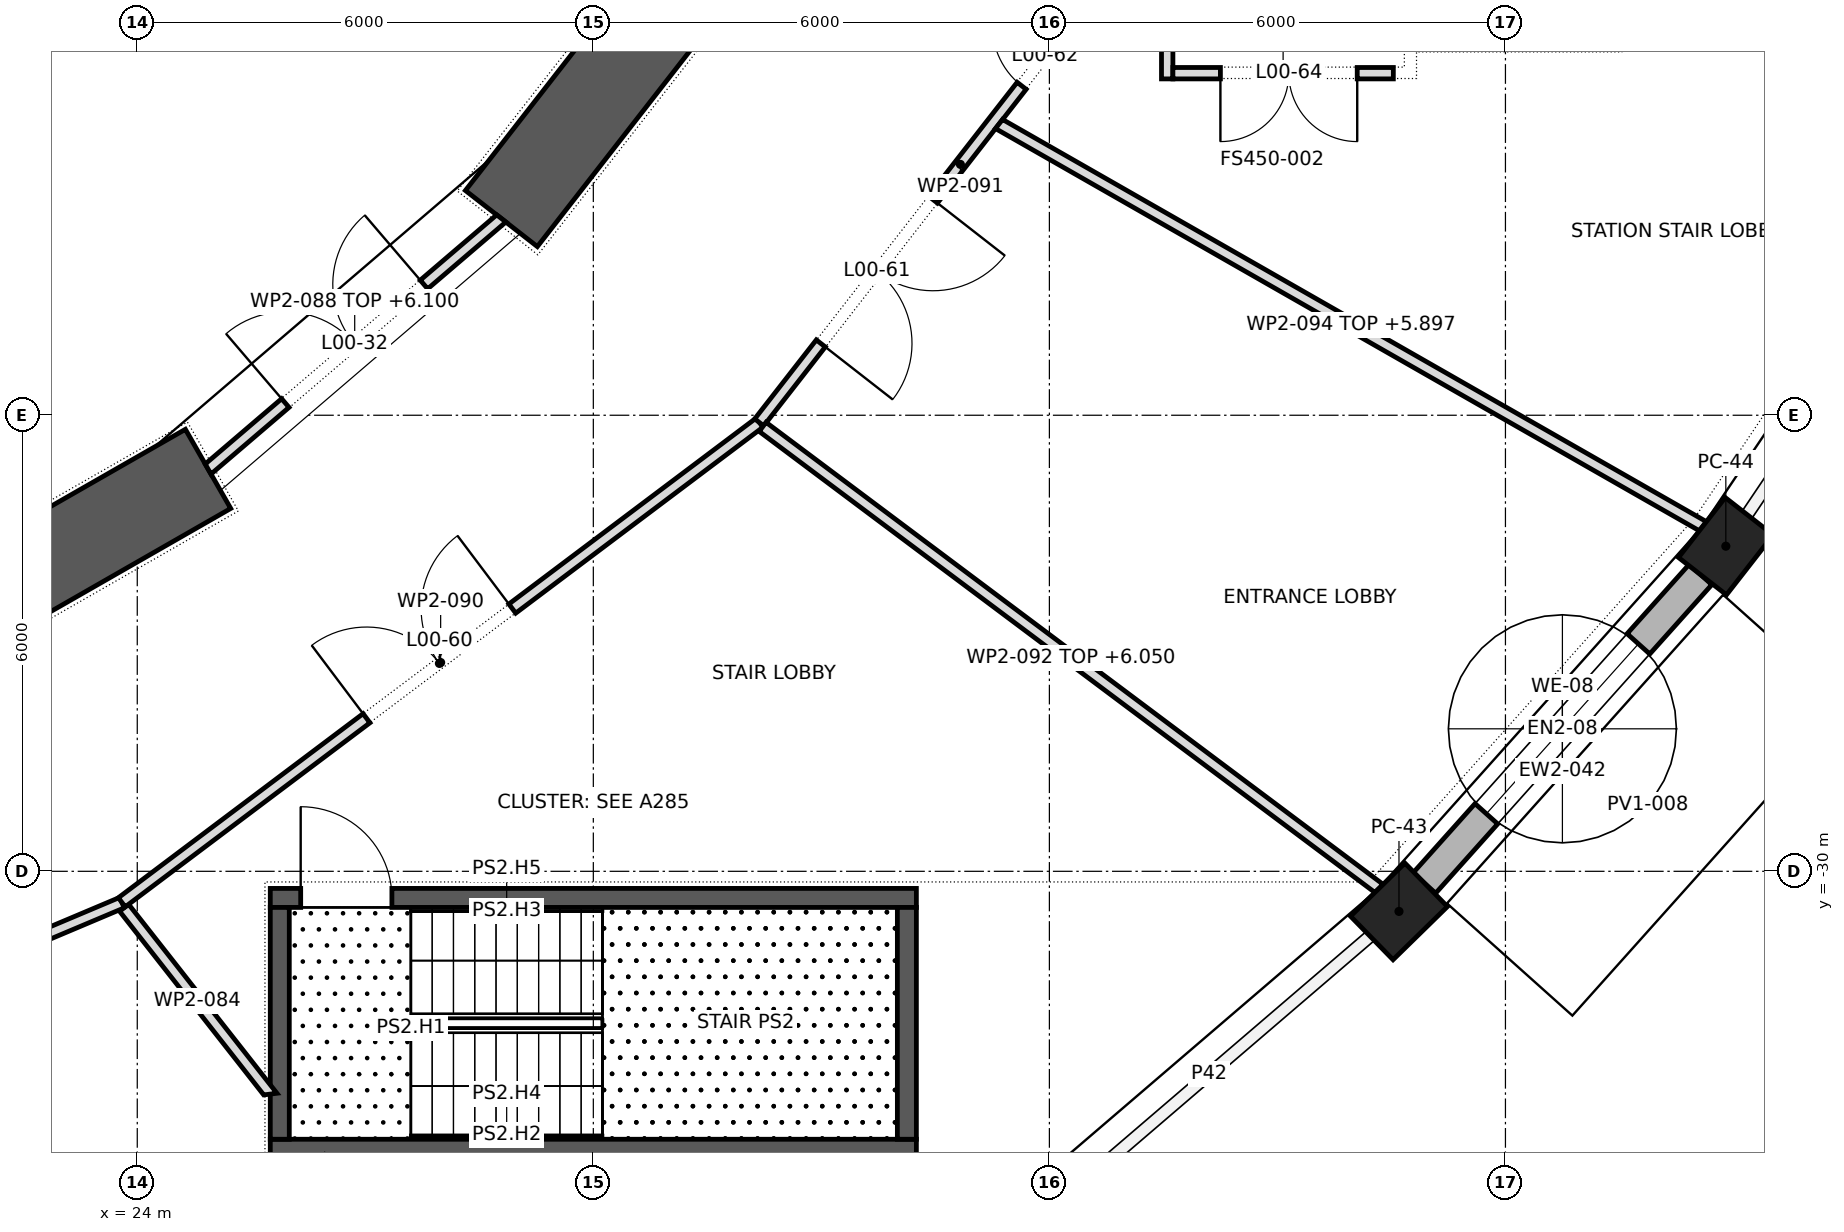
"""IFC4 building model, lengths in metres.
Left out: names, types, materials, properties, quantities, classifications, styles, units other than length and angle.
Written with IfcOpenShell. Run it as: python <this file> out.ifc"""

import sys

from ifc_helpers import new_model, si_unit, direction, frame, frame_2d, origin, origin_2d, place, context, subcontext, project, spatial, polyline, rectangle, outline, extrude, element, fill, save


model = new_model("IFC4")
c1 = context("Model", 3, precision=1e-05, world=origin(), true_north=direction((0.0, 1.0)))
c2 = subcontext(c1, "Body", "Model", "MODEL_VIEW")
j1 = project(units=[si_unit("LENGTHUNIT", "METRE"), si_unit("PLANEANGLEUNIT", "RADIAN")], contexts=[c1])
p1 = place(None, origin())
s1 = spatial("IfcSite", under=j1, at=p1, CompositionType="ELEMENT")
p2 = place(p1, origin())
s2 = spatial("IfcBuilding", under=s1, at=p2, CompositionType="ELEMENT")
p3 = place(p2, origin())
s3 = spatial("IfcBuildingStorey", under=s2, at=p3, CompositionType="ELEMENT", Elevation=0.0)
for number, where, z_axis, x_axis in (
    (1, (40.599, -30.528, 0.0), (0.0, 0.0, 1.0), (0.715, 0.699, 0.0)),
    (2, (44.899, -25.723, 0.0), (0.0, 0.0, 1.0), (0.615, 0.789, 0.0)),
):
    element("IfcColumn", number, at=place(p3, frame(where, z_axis=z_axis, x_axis=x_axis)), inside=s3, PredefinedType="COLUMN", context=c2, shape_type="SweptSolid", body=[
        extrude(rectangle(XDim=1.0, YDim=0.8, at=origin_2d()), origin(), (0.0, 0.0, 1.0), 7.0),
    ])
p4 = place(p3, frame((17.089, -29.198, 0.0), z_axis=(0.0, 0.0, 1.0), x_axis=(0.867760656864, 0.496982336103, 0.0)))
e3 = element("IfcWall", 3, at=p4, inside=s3, PredefinedType="SHEAR", context=c2, shape_type="SweptSolid", body=[
    extrude(rectangle(XDim=9.038, YDim=1.2, at=frame_2d((4.519, 0.0))), origin(), (0.0, 0.0, 1.0), 7.0),
])
p5 = place(p3, frame((28.79, -21.412, 0.0), z_axis=(0.0, 0.0, 1.0), x_axis=(0.614825322247, 0.788663314174, 0.0)))
e4 = element("IfcWall", 4, at=p5, inside=s3, PredefinedType="SHEAR", context=c2, shape_type="SweptSolid", body=[
    extrude(rectangle(XDim=8.632, YDim=1.2, at=frame_2d((4.316, 0.0))), origin(), (0.0, 0.0, 1.0), 7.0),
])
p6 = place(p3, frame((40.933, -30.155, 0.0), z_axis=(0.0, 0.0, 1.0), x_axis=(0.666902265084, 0.745145199827, 0.0)))
e5 = element("IfcWall", 5, at=p6, inside=s3, PredefinedType="STANDARD", context=c2, shape_type="SweptSolid", body=[
    extrude(rectangle(XDim=5.448, YDim=0.4, at=frame_2d((2.724, 0.0))), origin(), (0.0, 0.0, 1.0), 6.2),
])
p7 = place(p6, frame((1.224, 0.0, 0.0)))
e6 = element("IfcOpeningElement", 6, at=p7, cuts=e5, PredefinedType="OPENING", context=c2, shape_type="SweptSolid", body=[
    extrude(rectangle(XDim=3.0, YDim=3.0, at=frame_2d((1.5, 1.5))), frame((0.0, 0.212, 0.0), z_axis=(0.0, -1.0, 0.0), x_axis=(1.0, 0.0, 0.0)), (0.0, 0.0, 1.0), 0.424),
])
p8 = place(p6, frame((1.224, 0.0, 3.45)))
e7 = element("IfcOpeningElement", 7, at=p8, cuts=e5, PredefinedType="OPENING", context=c2, shape_type="SweptSolid", body=[
    extrude(rectangle(XDim=3.0, YDim=2.25, at=frame_2d((1.5, 1.125))), frame((0.0, 0.212, 0.0), z_axis=(0.0, -1.0, 0.0), x_axis=(1.0, 0.0, 0.0)), (0.0, 0.0, 1.0), 0.424),
])
p9 = place(p3, frame((25.75, -30.35, 0.0), z_axis=(0.0, 0.0, 1.0), x_axis=(1.0, 0.0, 0.0)))
e8 = element("IfcWall", 8, at=p9, inside=s3, PredefinedType="SHEAR", context=c2, shape_type="SweptSolid", body=[
    extrude(rectangle(XDim=8.5, YDim=0.25, at=frame_2d((4.25, 0.0))), origin(), (0.0, 0.0, 1.0), 6.65),
])
p10 = place(p9, frame((0.4, 0.0, 0.0)))
e9 = element("IfcOpeningElement", 9, at=p10, cuts=e8, PredefinedType="OPENING", context=c2, shape_type="SweptSolid", body=[
    extrude(rectangle(XDim=1.2, YDim=2.1, at=frame_2d((0.6, 1.05))), frame((0.0, 0.137, 0.0), z_axis=(0.0, -1.0, 0.0), x_axis=(1.0, 0.0, 0.0)), (0.0, 0.0, 1.0), 0.274),
])
p11 = place(p3, frame((25.75, -33.65, 0.0), z_axis=(0.0, 0.0, 1.0), x_axis=(1.0, 0.0, 0.0)))
e10 = element("IfcWall", 10, at=p11, inside=s3, PredefinedType="SHEAR", context=c2, shape_type="SweptSolid", body=[
    extrude(rectangle(XDim=8.5, YDim=0.25, at=frame_2d((4.25, 0.0))), origin(), (0.0, 0.0, 1.0), 6.65),
])
for number, where, z_axis, x_axis in (
    (11, (25.875, -33.525, 0.0), (0.0, 0.0, 1.0), (0.0, 1.0, 0.0)),
    (12, (34.125, -33.525, 0.0), (0.0, 0.0, 1.0), (0.0, 1.0, 0.0)),
):
    element("IfcWall", number, at=place(p3, frame(where, z_axis=z_axis, x_axis=x_axis)), inside=s3, PredefinedType="SHEAR", context=c2, shape_type="SweptSolid", body=[
        extrude(rectangle(XDim=3.05, YDim=0.25, at=frame_2d((1.525, 0.0))), origin(), (0.0, 0.0, 1.0), 6.65),
    ])
p12 = place(p3, frame((13.776, -34.643, 0.0), z_axis=(0.0, 0.0, 1.0), x_axis=(0.921269574612, 0.388924633951, 0.0)))
e13 = element("IfcWall", 13, at=p12, inside=s3, PredefinedType="PARTITIONING", context=c2, shape_type="SweptSolid", body=[
    extrude(rectangle(XDim=10.879, YDim=0.15, at=frame_2d((5.439, 0.0))), origin(), (0.0, 0.0, 1.0), 6.65),
])
p13 = place(p12, frame((7.626, 0.0, 0.0)))
e14 = element("IfcOpeningElement", 14, at=p13, cuts=e13, PredefinedType="OPENING", context=c2, shape_type="SweptSolid", body=[
    extrude(rectangle(XDim=1.0, YDim=2.1, at=frame_2d((0.5, 1.05))), frame((0.0, 0.087, 0.0), z_axis=(0.0, -1.0, 0.0), x_axis=(1.0, 0.0, 0.0)), (0.0, 0.0, 1.0), 0.174),
])
p14 = place(p12, frame((2.218, 0.0, 0.0)))
e15 = element("IfcOpeningElement", 15, at=p14, cuts=e13, PredefinedType="OPENING", context=c2, shape_type="SweptSolid", body=[
    extrude(rectangle(XDim=1.0, YDim=2.1, at=frame_2d((0.5, 1.05))), frame((0.0, 0.087, 0.0), z_axis=(0.0, -1.0, 0.0), x_axis=(1.0, 0.0, 0.0)), (0.0, 0.0, 1.0), 0.174),
])
p15 = place(p3, frame((18.81, -32.599, 0.0), z_axis=(0.0, 0.0, 1.0), x_axis=(0.499854452602, -0.866109419308, 0.0)))
e16 = element("IfcWall", 16, at=p15, inside=s3, PredefinedType="PARTITIONING", context=c2, shape_type="SweptSolid", body=[
    extrude(outline(polyline([(-0.009, -0.075), (9.864, -0.075), (9.883, 0.075), (0.009, 0.075), (-0.009, -0.075)])), origin(), (0.0, 0.0, 1.0), 6.05),
])
p16 = place(p3, frame((23.827, -30.48, 0.0), z_axis=(0.0, 0.0, 1.0), x_axis=(0.617357742076, -0.786682539719, 0.0)))
e17 = element("IfcWall", 17, at=p16, inside=s3, PredefinedType="PARTITIONING", context=c2, shape_type="SweptSolid", body=[
    extrude(outline(polyline([(0.0, -0.075), (3.071, -0.075), (3.161, 0.075), (0.0, 0.075), (0.0, -0.075)])), origin(), (0.0, 0.0, 1.0), 6.65),
])
p17 = place(p3, frame((28.789, -21.411, 0.0), z_axis=(0.0, 0.0, 1.0), x_axis=(-0.760084552743, -0.649824185978, 0.0)))
e18 = element("IfcWall", 18, at=p17, inside=s3, PredefinedType="PARTITIONING", context=c2, shape_type="SweptSolid", body=[
    extrude(outline(polyline([(0.015, -0.075), (5.061, -0.075), (5.089, 0.075), (-0.015, 0.075), (0.015, -0.075)])), origin(), (0.0, 0.0, 1.0), 6.1),
])
p18 = place(p17, frame((1.338, 0.0, 0.0)))
e19 = element("IfcOpeningElement", 19, at=p18, cuts=e18, PredefinedType="OPENING", context=c2, shape_type="SweptSolid", body=[
    extrude(rectangle(XDim=2.4, YDim=2.1, at=frame_2d((1.2, 1.05))), frame((0.0, 0.087, 0.0), z_axis=(0.0, -1.0, 0.0), x_axis=(1.0, 0.0, 0.0)), (0.0, 0.0, 1.0), 0.174),
])
p19 = place(p3, frame((32.186, -24.098, 0.0), z_axis=(0.0, 0.0, 1.0), x_axis=(-0.799192758851, -0.601074815809, 0.0)))
e20 = element("IfcWall", 20, at=p19, inside=s3, PredefinedType="PARTITIONING", context=c2, shape_type="SweptSolid", body=[
    extrude(rectangle(XDim=10.498, YDim=0.15, at=frame_2d((5.249, 0.0))), origin(), (0.0, 0.0, 1.0), 6.65),
])
p20 = place(p19, frame((4.07, 0.0, 0.0)))
e21 = element("IfcOpeningElement", 21, at=p20, cuts=e20, PredefinedType="OPENING", context=c2, shape_type="SweptSolid", body=[
    extrude(rectangle(XDim=2.4, YDim=2.1, at=frame_2d((1.2, 1.05))), frame((0.0, 0.087, 0.0), z_axis=(0.0, -1.0, 0.0), x_axis=(1.0, 0.0, 0.0)), (0.0, 0.0, 1.0), 0.174),
])
p21 = place(p3, frame((32.183, -24.094, 0.0), z_axis=(0.0, 0.0, 1.0), x_axis=(0.614892482098, 0.78861095317, 0.0)))
e22 = element("IfcWall", 22, at=p21, inside=s3, PredefinedType="PARTITIONING", context=c2, shape_type="SweptSolid", body=[
    extrude(rectangle(XDim=8.608, YDim=0.15, at=frame_2d((4.304, 0.0))), origin(), (0.0, 0.0, 1.0), 6.65),
])
p22 = place(p21, frame((1.317, 0.0, 0.0)))
e23 = element("IfcOpeningElement", 23, at=p22, cuts=e22, PredefinedType="OPENING", context=c2, shape_type="SweptSolid", body=[
    extrude(rectangle(XDim=2.4, YDim=2.1, at=frame_2d((1.2, 1.05))), frame((0.0, 0.087, 0.0), z_axis=(0.0, -1.0, 0.0), x_axis=(1.0, 0.0, 0.0)), (0.0, 0.0, 1.0), 0.174),
])
p23 = place(p21, frame((5.615, 0.0, 0.0)))
e24 = element("IfcOpeningElement", 24, at=p23, cuts=e22, PredefinedType="OPENING", context=c2, shape_type="SweptSolid", body=[
    extrude(rectangle(XDim=1.0, YDim=2.1, at=frame_2d((0.5, 1.05))), frame((0.0, 0.087, 0.0), z_axis=(0.0, -1.0, 0.0), x_axis=(1.0, 0.0, 0.0)), (0.0, 0.0, 1.0), 0.174),
])
p24 = place(p3, frame((32.227, -24.153, 0.0), z_axis=(0.0, 0.0, 1.0), x_axis=(0.800465305701, -0.599379090701, 0.0)))
e25 = element("IfcWall", 25, at=p24, inside=s3, PredefinedType="PARTITIONING", context=c2, shape_type="SweptSolid", body=[
    extrude(outline(polyline([(0.0, -0.075), (10.12, -0.075), (10.144, 0.075), (0.0, 0.075), (0.0, -0.075)])), origin(), (0.0, 0.0, 1.0), 6.05),
])
p25 = place(p3, frame((35.337, -20.168, 0.0), z_axis=(0.0, 0.0, 1.0), x_axis=(0.868241733504, -0.496141403435, 0.0)))
e26 = element("IfcWall", 26, at=p25, inside=s3, PredefinedType="PARTITIONING", context=c2, shape_type="SweptSolid", body=[
    extrude(outline(polyline([(-0.011, -0.075), (10.655, -0.075), (10.677, 0.075), (0.011, 0.075), (-0.011, -0.075)])), origin(), (0.0, 0.0, 1.0), 5.897),
])
p26 = place(p3, frame((37.55, -19.575, 0.0), z_axis=(0.0, 0.0, 1.0), x_axis=(0.0, 1.0, 0.0)))
e27 = element("IfcWall", 27, at=p26, inside=s3, PredefinedType="PARTITIONING", context=c2, shape_type="SweptSolid", body=[
    extrude(rectangle(XDim=4.65, YDim=0.15, at=frame_2d((2.325, 0.0))), origin(), (0.0, 0.0, 1.0), 6.65),
])
p27 = place(p3, frame((40.525, -19.5, 0.0), z_axis=(0.0, 0.0, 1.0), x_axis=(-1.0, 0.0, 0.0)))
e28 = element("IfcWall", 28, at=p27, inside=s3, PredefinedType="PARTITIONING", context=c2, shape_type="SweptSolid", body=[
    extrude(rectangle(XDim=2.9, YDim=0.15, at=frame_2d((1.45, 0.0))), origin(), (0.0, 0.0, 1.0), 6.65),
])
p28 = place(p27, frame((0.475, 0.0, 0.0)))
e29 = element("IfcOpeningElement", 29, at=p28, cuts=e28, PredefinedType="OPENING", context=c2, shape_type="SweptSolid", body=[
    extrude(rectangle(XDim=1.8, YDim=2.1, at=frame_2d((0.9, 1.05))), frame((0.0, 0.087, 0.0), z_axis=(0.0, -1.0, 0.0), x_axis=(1.0, 0.0, 0.0)), (0.0, 0.0, 1.0), 0.174),
])
p29 = place(p7, frame((3.0, 0.0, 0.0), z_axis=(0.0, 0.0, 1.0), x_axis=(-1.0, 0.0, 0.0)))
e30 = element("IfcDoor", 30, at=p29, inside=s3, OperationType="REVOLVING", PredefinedType="DOOR", context=c2, shape_type="SweptSolid", body=[
    extrude(rectangle(XDim=3.0, YDim=3.0, at=frame_2d((1.5, 1.5))), frame((0.0, 0.025, 0.0), z_axis=(0.0, -1.0, 0.0), x_axis=(1.0, 0.0, 0.0)), (0.0, 0.0, 1.0), 0.05),
])
fill(e6, e30)
p30 = place(p8, origin())
e31 = element("IfcWindow", 31, at=p30, inside=s3, PartitioningType="DOUBLE_PANEL_VERTICAL", PredefinedType="WINDOW", context=c2, shape_type="SweptSolid", body=[
    extrude(rectangle(XDim=3.0, YDim=2.25, at=frame_2d((1.5, 1.125))), frame((0.0, 0.03, 0.0), z_axis=(0.0, -1.0, 0.0), x_axis=(1.0, 0.0, 0.0)), (0.0, 0.0, 1.0), 0.06),
])
fill(e7, e31)
p31 = place(p10, origin())
e32 = element("IfcDoor", 32, at=p31, inside=s3, OperationType="SINGLE_SWING_RIGHT", PredefinedType="DOOR", context=c2, shape_type="SweptSolid", body=[
    extrude(rectangle(XDim=1.2, YDim=2.1, at=frame_2d((0.6, 1.05))), frame((0.0, 0.025, 0.0), z_axis=(0.0, -1.0, 0.0), x_axis=(1.0, 0.0, 0.0)), (0.0, 0.0, 1.0), 0.05),
])
fill(e9, e32)
p32 = place(p18, frame((2.4, 0.0, 0.0), z_axis=(0.0, 0.0, 1.0), x_axis=(-1.0, 0.0, 0.0)))
e33 = element("IfcDoor", 33, at=p32, inside=s3, OperationType="DOUBLE_DOOR_SINGLE_SWING", PredefinedType="DOOR", context=c2, shape_type="SweptSolid", body=[
    extrude(rectangle(XDim=2.4, YDim=2.1, at=frame_2d((1.2, 1.05))), frame((0.0, 0.025, 0.0), z_axis=(0.0, -1.0, 0.0), x_axis=(1.0, 0.0, 0.0)), (0.0, 0.0, 1.0), 0.05),
])
fill(e19, e33)
p33 = place(p20, frame((2.4, 0.0, 0.0), z_axis=(0.0, 0.0, 1.0), x_axis=(-1.0, 0.0, 0.0)))
e34 = element("IfcDoor", 34, at=p33, inside=s3, OperationType="DOUBLE_DOOR_SINGLE_SWING", PredefinedType="DOOR", context=c2, shape_type="SweptSolid", body=[
    extrude(rectangle(XDim=2.4, YDim=2.1, at=frame_2d((1.2, 1.05))), frame((0.0, 0.025, 0.0), z_axis=(0.0, -1.0, 0.0), x_axis=(1.0, 0.0, 0.0)), (0.0, 0.0, 1.0), 0.05),
])
fill(e21, e34)
p34 = place(p22, frame((2.4, 0.0, 0.0), z_axis=(0.0, 0.0, 1.0), x_axis=(-1.0, 0.0, 0.0)))
e35 = element("IfcDoor", 35, at=p34, inside=s3, OperationType="DOUBLE_DOOR_SINGLE_SWING", PredefinedType="DOOR", context=c2, shape_type="SweptSolid", body=[
    extrude(rectangle(XDim=2.4, YDim=2.1, at=frame_2d((1.2, 1.05))), frame((0.0, 0.025, 0.0), z_axis=(0.0, -1.0, 0.0), x_axis=(1.0, 0.0, 0.0)), (0.0, 0.0, 1.0), 0.05),
])
fill(e23, e35)
p35 = place(p23, origin())
e36 = element("IfcDoor", 36, at=p35, inside=s3, OperationType="SINGLE_SWING_LEFT", PredefinedType="DOOR", context=c2, shape_type="SweptSolid", body=[
    extrude(rectangle(XDim=1.0, YDim=2.1, at=frame_2d((0.5, 1.05))), frame((0.0, 0.025, 0.0), z_axis=(0.0, -1.0, 0.0), x_axis=(1.0, 0.0, 0.0)), (0.0, 0.0, 1.0), 0.05),
])
fill(e24, e36)
p36 = place(p28, origin())
e37 = element("IfcDoor", 37, at=p36, inside=s3, OperationType="DOUBLE_DOOR_SINGLE_SWING", PredefinedType="DOOR", context=c2, shape_type="SweptSolid", body=[
    extrude(rectangle(XDim=1.8, YDim=2.1, at=frame_2d((0.9, 1.05))), frame((0.0, 0.025, 0.0), z_axis=(0.0, -1.0, 0.0), x_axis=(1.0, 0.0, 0.0)), (0.0, 0.0, 1.0), 0.05),
])
fill(e29, e37)
save(model, sys.argv[1])
